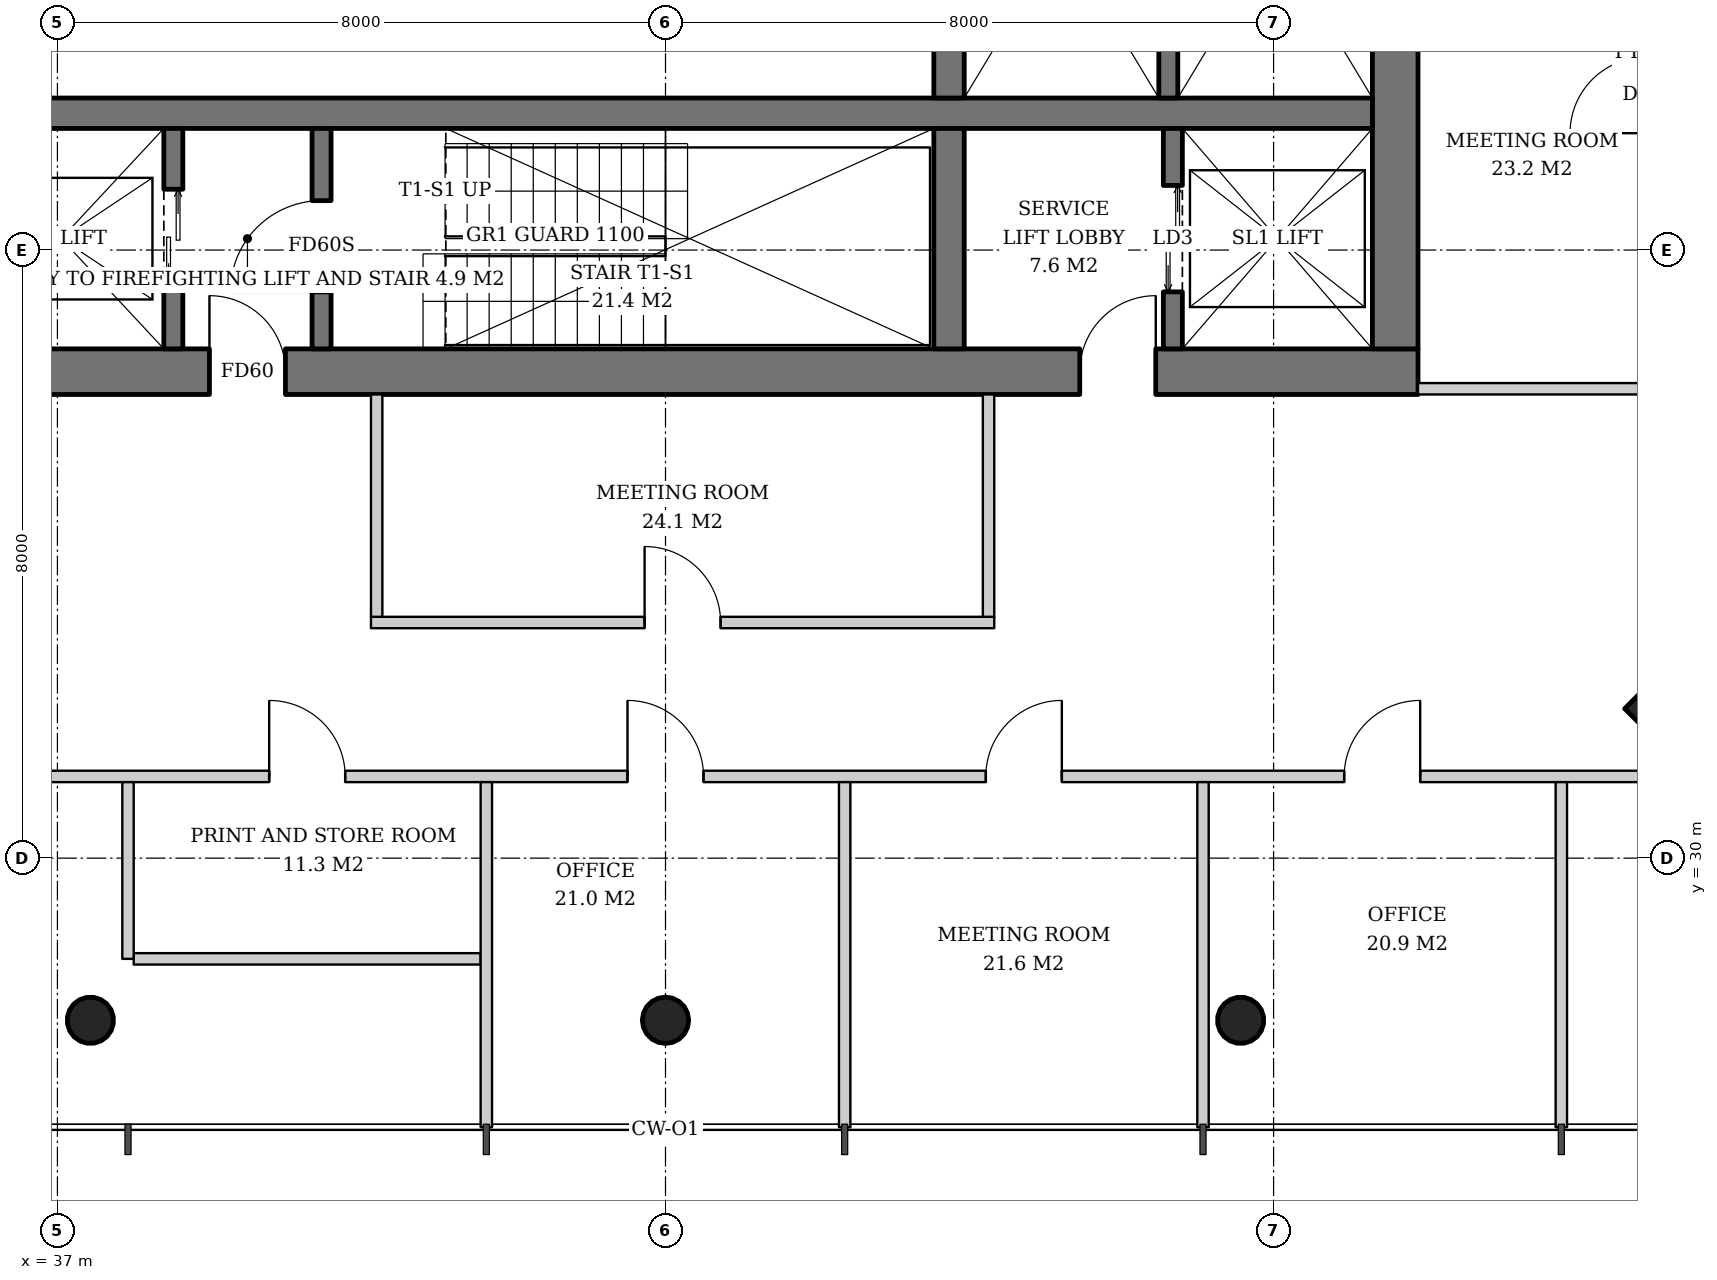
"""IFC4 building model, lengths in metres.
Left out: names, types, materials, properties, quantities, classifications, styles, units other than length and angle.
Written with IfcOpenShell. Run it as: python <this file> out.ifc"""

import sys

from ifc_helpers import new_model, si_unit, direction, frame, frame_2d, origin, origin_2d, place, context, subcontext, project, spatial, rectangle, hollow_circle, extrude, element, fill, save


model = new_model("IFC4")
c1 = context("Model", 3, precision=1e-05, world=origin(), true_north=direction((0.0, 1.0)))
c2 = subcontext(c1, "Body", "Model", "MODEL_VIEW")
j1 = project(units=[si_unit("LENGTHUNIT", "METRE"), si_unit("PLANEANGLEUNIT", "RADIAN")], contexts=[c1])
p1 = place(None, origin())
s1 = spatial("IfcSite", under=j1, at=p1, CompositionType="ELEMENT")
p2 = place(p1, origin())
s2 = spatial("IfcBuilding", under=s1, at=p2, CompositionType="ELEMENT")
p3 = place(p2, frame((0.0, 0.0, 203.4)))
s3 = spatial("IfcBuildingStorey", under=s2, at=p3, CompositionType="ELEMENT", Elevation=203.4)
p4 = place(p3, frame((59.072, 31.928, 0.0), z_axis=(-0.031962158256, 0.031962158256, 0.998977898093), x_axis=(-0.707106781187, -0.707106781187, 0.0)))
e1 = element("IfcColumn", 1, at=p4, inside=s3, PredefinedType="COLUMN", context=c2, shape_type="SweptSolid", body=[
    extrude(rectangle(XDim=2.0, YDim=2.0, at=origin_2d()), origin(), (0.0, 0.0, 1.0), 3.804),
])
p5 = place(p3, frame((37.414, 27.829, 0.0), z_axis=(0.015987237665, 0.031910269556, 0.999362868496), x_axis=(-0.894067115991, 0.447933021895, 0.0)))
e2 = element("IfcColumn", 2, at=p5, inside=s3, PredefinedType="COLUMN", context=c2, shape_type="SweptSolid", body=[
    extrude(hollow_circle(Radius=0.305, WallThickness=0.025, at=origin_2d()), origin(), (0.0, 0.0, 1.0), 3.802),
])
p6 = place(p3, frame((45.0, 27.829, 0.0), z_axis=(0.0, 0.031914348339, 0.999490607445), x_axis=(-1.0, 0.0, 0.0)))
e3 = element("IfcColumn", 3, at=p6, inside=s3, PredefinedType="COLUMN", context=c2, shape_type="SweptSolid", body=[
    extrude(hollow_circle(Radius=0.305, WallThickness=0.025, at=origin_2d()), origin(), (0.0, 0.0, 1.0), 3.802),
])
p7 = place(p3, frame((52.586, 27.829, 0.0), z_axis=(-0.015987237665, 0.031910269556, 0.999362868496), x_axis=(-0.894067115991, -0.447933021895, 0.0)))
e4 = element("IfcColumn", 4, at=p7, inside=s3, PredefinedType="COLUMN", context=c2, shape_type="SweptSolid", body=[
    extrude(hollow_circle(Radius=0.305, WallThickness=0.025, at=origin_2d()), origin(), (0.0, 0.0, 1.0), 3.802),
])
p8 = place(p3, frame((35.1, 36.4, 0.0), z_axis=(0.0, 0.0, 1.0), x_axis=(1.0, 0.0, 0.0)))
e5 = element("IfcWall", 5, at=p8, inside=s3, PredefinedType="SHEAR", context=c2, shape_type="SweptSolid", body=[
    extrude(rectangle(XDim=19.8, YDim=0.6, at=frame_2d((9.9, 0.0))), origin(), (0.0, 0.0, 1.0), 3.8),
])
p9 = place(p8, frame((3.9, 0.0, 0.0)))
e6 = element("IfcOpeningElement", 6, at=p9, cuts=e5, PredefinedType="OPENING", context=c2, shape_type="SweptSolid", body=[
    extrude(rectangle(XDim=1.0, YDim=2.1, at=frame_2d((0.5, 1.05))), frame((0.0, 0.31, 0.0), z_axis=(0.0, -1.0, 0.0), x_axis=(1.0, 0.0, 0.0)), (0.0, 0.0, 1.0), 0.62),
])
p10 = place(p8, frame((15.35, 0.0, 0.0)))
e7 = element("IfcOpeningElement", 7, at=p10, cuts=e5, PredefinedType="OPENING", context=c2, shape_type="SweptSolid", body=[
    extrude(rectangle(XDim=1.0, YDim=2.1, at=frame_2d((0.5, 1.05))), frame((0.0, 0.31, 0.0), z_axis=(0.0, -1.0, 0.0), x_axis=(1.0, 0.0, 0.0)), (0.0, 0.0, 1.0), 0.62),
])
p11 = place(p3, frame((54.6, 36.7, 0.0), z_axis=(0.0, 0.0, 1.0), x_axis=(0.0, 1.0, 0.0)))
e8 = element("IfcWall", 8, at=p11, inside=s3, PredefinedType="SHEAR", context=c2, shape_type="SweptSolid", body=[
    extrude(rectangle(XDim=18.6, YDim=0.6, at=frame_2d((9.3, 0.0))), origin(), (0.0, 0.0, 1.0), 3.8),
])
p12 = place(p11, frame((8.4, 0.0, 0.0)))
e9 = element("IfcOpeningElement", 9, at=p12, cuts=e8, PredefinedType="OPENING", context=c2, shape_type="SweptSolid", body=[
    extrude(rectangle(XDim=1.8, YDim=2.4, at=frame_2d((0.9, 1.2))), frame((0.0, 0.31, 0.0), z_axis=(0.0, -1.0, 0.0), x_axis=(1.0, 0.0, 0.0)), (0.0, 0.0, 1.0), 0.62),
])
p13 = place(p3, frame((35.7, 39.8, 0.0), z_axis=(0.0, 0.0, 1.0), x_axis=(1.0, 0.0, 0.0)))
e10 = element("IfcWall", 10, at=p13, inside=s3, PredefinedType="SHEAR", context=c2, shape_type="SweptSolid", body=[
    extrude(rectangle(XDim=18.6, YDim=0.4, at=frame_2d((9.3, 0.0))), origin(), (0.0, 0.0, 1.0), 3.8),
])
p14 = place(p3, frame((48.73, 36.7, 0.0), z_axis=(0.0, 0.0, 1.0), x_axis=(0.0, 1.0, 0.0)))
e11 = element("IfcWall", 11, at=p14, inside=s3, PredefinedType="SHEAR", context=c2, shape_type="SweptSolid", body=[
    extrude(rectangle(XDim=2.9, YDim=0.4, at=frame_2d((1.45, 0.0))), origin(), (0.0, 0.0, 1.0), 3.8),
])
p15 = place(p3, frame((48.73, 40.0, 0.0), z_axis=(0.0, 0.0, 1.0), x_axis=(0.0, 1.0, 0.0)))
e12 = element("IfcWall", 12, at=p15, inside=s3, PredefinedType="SHEAR", context=c2, shape_type="SweptSolid", body=[
    extrude(rectangle(XDim=12.0, YDim=0.4, at=frame_2d((6.0, 0.0))), origin(), (0.0, 0.0, 1.0), 3.8),
])
p16 = place(p3, frame((38.525, 36.7, 0.0), z_axis=(0.0, 0.0, 1.0), x_axis=(0.0, 1.0, 0.0)))
e13 = element("IfcWall", 13, at=p16, inside=s3, PredefinedType="SHEAR", context=c2, shape_type="SweptSolid", body=[
    extrude(rectangle(XDim=2.9, YDim=0.25, at=frame_2d((1.45, 0.0))), origin(), (0.0, 0.0, 1.0), 3.8),
])
p17 = place(p16, frame((0.8, 0.0, 0.0)))
e14 = element("IfcOpeningElement", 14, at=p17, cuts=e13, PredefinedType="OPENING", context=c2, shape_type="SweptSolid", body=[
    extrude(rectangle(XDim=1.3, YDim=2.2, at=frame_2d((0.65, 1.1))), frame((0.0, 0.135, 0.0), z_axis=(0.0, -1.0, 0.0), x_axis=(1.0, 0.0, 0.0)), (0.0, 0.0, 1.0), 0.27),
])
p18 = place(p3, frame((40.475, 36.7, 0.0), z_axis=(0.0, 0.0, 1.0), x_axis=(0.0, 1.0, 0.0)))
e15 = element("IfcWall", 15, at=p18, inside=s3, PredefinedType="SHEAR", context=c2, shape_type="SweptSolid", body=[
    extrude(rectangle(XDim=2.9, YDim=0.25, at=frame_2d((1.45, 0.0))), origin(), (0.0, 0.0, 1.0), 3.8),
])
p19 = place(p18, frame((0.75, 0.0, 0.0)))
e16 = element("IfcOpeningElement", 16, at=p19, cuts=e15, PredefinedType="OPENING", context=c2, shape_type="SweptSolid", body=[
    extrude(rectangle(XDim=1.2, YDim=2.1, at=frame_2d((0.6, 1.05))), frame((0.0, 0.135, 0.0), z_axis=(0.0, -1.0, 0.0), x_axis=(1.0, 0.0, 0.0)), (0.0, 0.0, 1.0), 0.27),
])
p20 = place(p3, frame((51.675, 36.7, 0.0), z_axis=(0.0, 0.0, 1.0), x_axis=(0.0, 1.0, 0.0)))
e17 = element("IfcWall", 17, at=p20, inside=s3, PredefinedType="SHEAR", context=c2, shape_type="SweptSolid", body=[
    extrude(rectangle(XDim=2.9, YDim=0.25, at=frame_2d((1.45, 0.0))), origin(), (0.0, 0.0, 1.0), 3.8),
])
p21 = place(p20, frame((0.75, 0.0, 0.0)))
e18 = element("IfcOpeningElement", 18, at=p21, cuts=e17, PredefinedType="OPENING", context=c2, shape_type="SweptSolid", body=[
    extrude(rectangle(XDim=1.4, YDim=2.4, at=frame_2d((0.7, 1.2))), frame((0.0, 0.135, 0.0), z_axis=(0.0, -1.0, 0.0), x_axis=(1.0, 0.0, 0.0)), (0.0, 0.0, 1.0), 0.27),
])
p22 = place(p3, frame((51.615, 44.25, 0.0), z_axis=(0.0, 0.0, 1.0), x_axis=(0.0, -1.0, 0.0)))
e19 = element("IfcWall", 19, at=p22, inside=s3, PredefinedType="SHEAR", context=c2, shape_type="SweptSolid", body=[
    extrude(rectangle(XDim=4.25, YDim=0.25, at=frame_2d((2.125, 0.0))), origin(), (0.0, 0.0, 1.0), 3.8),
])
p23 = place(p3, frame((54.9, 36.175, 0.0), z_axis=(0.0, 0.0, 1.0), x_axis=(1.0, 0.0, 0.0)))
e20 = element("IfcWall", 20, at=p23, inside=s3, PredefinedType="PARTITIONING", context=c2, shape_type="SweptSolid", body=[
    extrude(rectangle(XDim=2.925, YDim=0.15, at=frame_2d((1.462, 0.0))), origin(), (0.0, 0.0, 1.0), 2.867),
])
p24 = place(p3, frame((41.125, 33.1, 0.0), z_axis=(0.0, 0.0, 1.0), x_axis=(1.0, 0.0, 0.0)))
e21 = element("IfcWall", 21, at=p24, inside=s3, PredefinedType="PARTITIONING", context=c2, shape_type="SweptSolid", body=[
    extrude(rectangle(XDim=8.2, YDim=0.15, at=frame_2d((4.1, 0.0))), origin(), (0.0, 0.0, 1.0), 2.867),
])
p25 = place(p24, frame((3.6, 0.0, 0.0)))
e22 = element("IfcOpeningElement", 22, at=p25, cuts=e21, PredefinedType="OPENING", context=c2, shape_type="SweptSolid", body=[
    extrude(rectangle(XDim=1.0, YDim=2.1, at=frame_2d((0.5, 1.05))), frame((0.0, 0.085, 0.0), z_axis=(0.0, -1.0, 0.0), x_axis=(1.0, 0.0, 0.0)), (0.0, 0.0, 1.0), 0.17),
])
for number, where, z_axis, x_axis in (
    (23, (41.2, 36.1, 0.0), (0.0, 0.0, 1.0), (0.0, -1.0, 0.0)),
    (24, (49.25, 36.1, 0.0), (0.0, 0.0, 1.0), (0.0, -1.0, 0.0)),
):
    element("IfcWall", number, at=place(p3, frame(where, z_axis=z_axis, x_axis=x_axis)), inside=s3, PredefinedType="PARTITIONING", context=c2, shape_type="SweptSolid", body=[
        extrude(rectangle(XDim=2.925, YDim=0.15, at=frame_2d((1.462, 0.0))), origin(), (0.0, 0.0, 1.0), 3.62),
    ])
p26 = place(p3, frame((38.004, 28.675, 0.0), z_axis=(0.0, 0.0, 1.0), x_axis=(1.0, 0.0, 0.0)))
e25 = element("IfcWall", 25, at=p26, inside=s3, PredefinedType="PARTITIONING", context=c2, shape_type="SweptSolid", body=[
    extrude(rectangle(XDim=4.564, YDim=0.15, at=frame_2d((2.282, 0.0))), origin(), (0.0, 0.0, 1.0), 2.867),
])
p27 = place(p3, frame((31.564, 31.075, 0.0), z_axis=(0.0, 0.0, 1.0), x_axis=(1.0, 0.0, 0.0)))
e26 = element("IfcWall", 26, at=p27, inside=s3, PredefinedType="PARTITIONING", context=c2, shape_type="SweptSolid", body=[
    extrude(rectangle(XDim=26.872, YDim=0.15, at=frame_2d((13.436, 0.0))), origin(), (0.0, 0.0, 1.0), 2.867),
])
p28 = place(p27, frame((3.507, 0.0, 0.0)))
e27 = element("IfcOpeningElement", 27, at=p28, cuts=e26, PredefinedType="OPENING", context=c2, shape_type="SweptSolid", body=[
    extrude(rectangle(XDim=1.0, YDim=2.1, at=frame_2d((0.5, 1.05))), frame((0.0, 0.085, 0.0), z_axis=(0.0, -1.0, 0.0), x_axis=(1.0, 0.0, 0.0)), (0.0, 0.0, 1.0), 0.17),
])
p29 = place(p27, frame((8.221, 0.0, 0.0)))
e28 = element("IfcOpeningElement", 28, at=p29, cuts=e26, PredefinedType="OPENING", context=c2, shape_type="SweptSolid", body=[
    extrude(rectangle(XDim=1.0, YDim=2.1, at=frame_2d((0.5, 1.05))), frame((0.0, 0.085, 0.0), z_axis=(0.0, -1.0, 0.0), x_axis=(1.0, 0.0, 0.0)), (0.0, 0.0, 1.0), 0.17),
])
p30 = place(p27, frame((12.936, 0.0, 0.0)))
e29 = element("IfcOpeningElement", 29, at=p30, cuts=e26, PredefinedType="OPENING", context=c2, shape_type="SweptSolid", body=[
    extrude(rectangle(XDim=1.0, YDim=2.1, at=frame_2d((0.5, 1.05))), frame((0.0, 0.085, 0.0), z_axis=(0.0, -1.0, 0.0), x_axis=(1.0, 0.0, 0.0)), (0.0, 0.0, 1.0), 0.17),
])
p31 = place(p27, frame((17.65, 0.0, 0.0)))
e30 = element("IfcOpeningElement", 30, at=p31, cuts=e26, PredefinedType="OPENING", context=c2, shape_type="SweptSolid", body=[
    extrude(rectangle(XDim=1.0, YDim=2.1, at=frame_2d((0.5, 1.05))), frame((0.0, 0.085, 0.0), z_axis=(0.0, -1.0, 0.0), x_axis=(1.0, 0.0, 0.0)), (0.0, 0.0, 1.0), 0.17),
])
p32 = place(p27, frame((22.364, 0.0, 0.0)))
e31 = element("IfcOpeningElement", 31, at=p32, cuts=e26, PredefinedType="OPENING", context=c2, shape_type="SweptSolid", body=[
    extrude(rectangle(XDim=1.0, YDim=2.1, at=frame_2d((0.5, 1.05))), frame((0.0, 0.085, 0.0), z_axis=(0.0, -1.0, 0.0), x_axis=(1.0, 0.0, 0.0)), (0.0, 0.0, 1.0), 0.17),
])
p33 = place(p3, frame((37.928, 31.0, 0.0), z_axis=(0.0, 0.0, 1.0), x_axis=(0.0, -1.0, 0.0)))
e32 = element("IfcWall", 32, at=p33, inside=s3, PredefinedType="PARTITIONING", context=c2, shape_type="SweptSolid", body=[
    extrude(rectangle(XDim=2.325, YDim=0.15, at=frame_2d((1.163, 0.0))), origin(), (0.0, 0.0, 1.0), 3.62),
])
p34 = place(p3, frame((42.643, 31.0, 0.0), z_axis=(0.0, 0.0, 1.0), x_axis=(0.0, -1.0, 0.0)))
e33 = element("IfcWall", 33, at=p34, inside=s3, PredefinedType="PARTITIONING", context=c2, shape_type="SweptSolid", body=[
    extrude(rectangle(XDim=4.54, YDim=0.15, at=frame_2d((2.27, 0.0))), origin(), (0.0, 0.0, 1.0), 3.12),
])
p35 = place(p3, frame((47.357, 31.0, 0.0), z_axis=(0.0, 0.0, 1.0), x_axis=(0.0, -1.0, 0.0)))
e34 = element("IfcWall", 34, at=p35, inside=s3, PredefinedType="PARTITIONING", context=c2, shape_type="SweptSolid", body=[
    extrude(rectangle(XDim=4.54, YDim=0.15, at=frame_2d((2.27, 0.0))), origin(), (0.0, 0.0, 1.0), 2.867),
])
for number, where, z_axis, x_axis in (
    (35, (52.072, 31.0, 0.0), (0.0, 0.0, 1.0), (0.0, -1.0, 0.0)),
    (36, (56.786, 31.0, 0.0), (0.0, 0.0, 1.0), (0.0, -1.0, 0.0)),
):
    element("IfcWall", number, at=place(p3, frame(where, z_axis=z_axis, x_axis=x_axis)), inside=s3, PredefinedType="PARTITIONING", context=c2, shape_type="SweptSolid", body=[
        extrude(rectangle(XDim=4.54, YDim=0.15, at=frame_2d((2.27, 0.0))), origin(), (0.0, 0.0, 1.0), 3.12),
    ])
p36 = place(p17, origin())
e37 = element("IfcDoor", 37, at=p36, inside=s3, OperationType="DOUBLE_DOOR_SLIDING", PredefinedType="DOOR", context=c2, shape_type="SweptSolid", body=[
    extrude(rectangle(XDim=1.3, YDim=2.2, at=frame_2d((0.65, 1.1))), frame((0.0, 0.025, 0.0), z_axis=(0.0, -1.0, 0.0), x_axis=(1.0, 0.0, 0.0)), (0.0, 0.0, 1.0), 0.05),
])
fill(e14, e37)
p37 = place(p19, origin())
e38 = element("IfcDoor", 38, at=p37, inside=s3, OperationType="SINGLE_SWING_LEFT", PredefinedType="DOOR", context=c2, shape_type="SweptSolid", body=[
    extrude(rectangle(XDim=1.2, YDim=2.1, at=frame_2d((0.6, 1.05))), frame((0.0, 0.025, 0.0), z_axis=(0.0, -1.0, 0.0), x_axis=(1.0, 0.0, 0.0)), (0.0, 0.0, 1.0), 0.05),
])
fill(e16, e38)
p38 = place(p21, origin())
e39 = element("IfcDoor", 39, at=p38, inside=s3, OperationType="DOUBLE_DOOR_SLIDING", PredefinedType="DOOR", context=c2, shape_type="SweptSolid", body=[
    extrude(rectangle(XDim=1.4, YDim=2.4, at=frame_2d((0.7, 1.2))), frame((0.0, 0.025, 0.0), z_axis=(0.0, -1.0, 0.0), x_axis=(1.0, 0.0, 0.0)), (0.0, 0.0, 1.0), 0.05),
])
fill(e18, e39)
p39 = place(p9, origin())
e40 = element("IfcDoor", 40, at=p39, inside=s3, OperationType="SINGLE_SWING_LEFT", PredefinedType="DOOR", context=c2, shape_type="SweptSolid", body=[
    extrude(rectangle(XDim=1.0, YDim=2.1, at=frame_2d((0.5, 1.05))), frame((0.0, 0.025, 0.0), z_axis=(0.0, -1.0, 0.0), x_axis=(1.0, 0.0, 0.0)), (0.0, 0.0, 1.0), 0.05),
])
fill(e6, e40)
p40 = place(p10, origin())
e41 = element("IfcDoor", 41, at=p40, inside=s3, OperationType="SINGLE_SWING_RIGHT", PredefinedType="DOOR", context=c2, shape_type="SweptSolid", body=[
    extrude(rectangle(XDim=1.0, YDim=2.1, at=frame_2d((0.5, 1.05))), frame((0.0, 0.025, 0.0), z_axis=(0.0, -1.0, 0.0), x_axis=(1.0, 0.0, 0.0)), (0.0, 0.0, 1.0), 0.05),
])
fill(e7, e41)
p41 = place(p25, origin())
e42 = element("IfcDoor", 42, at=p41, inside=s3, OperationType="SINGLE_SWING_LEFT", PredefinedType="DOOR", context=c2, shape_type="SweptSolid", body=[
    extrude(rectangle(XDim=1.0, YDim=2.1, at=frame_2d((0.5, 1.05))), frame((0.0, 0.025, 0.0), z_axis=(0.0, -1.0, 0.0), x_axis=(1.0, 0.0, 0.0)), (0.0, 0.0, 1.0), 0.05),
])
fill(e22, e42)
p42 = place(p29, origin())
e43 = element("IfcDoor", 43, at=p42, inside=s3, OperationType="SINGLE_SWING_LEFT", PredefinedType="DOOR", context=c2, shape_type="SweptSolid", body=[
    extrude(rectangle(XDim=1.0, YDim=2.1, at=frame_2d((0.5, 1.05))), frame((0.0, 0.025, 0.0), z_axis=(0.0, -1.0, 0.0), x_axis=(1.0, 0.0, 0.0)), (0.0, 0.0, 1.0), 0.05),
])
fill(e28, e43)
p43 = place(p30, origin())
e44 = element("IfcDoor", 44, at=p43, inside=s3, OperationType="SINGLE_SWING_LEFT", PredefinedType="DOOR", context=c2, shape_type="SweptSolid", body=[
    extrude(rectangle(XDim=1.0, YDim=2.1, at=frame_2d((0.5, 1.05))), frame((0.0, 0.025, 0.0), z_axis=(0.0, -1.0, 0.0), x_axis=(1.0, 0.0, 0.0)), (0.0, 0.0, 1.0), 0.05),
])
fill(e29, e44)
p44 = place(p31, origin())
e45 = element("IfcDoor", 45, at=p44, inside=s3, OperationType="SINGLE_SWING_RIGHT", PredefinedType="DOOR", context=c2, shape_type="SweptSolid", body=[
    extrude(rectangle(XDim=1.0, YDim=2.1, at=frame_2d((0.5, 1.05))), frame((0.0, 0.025, 0.0), z_axis=(0.0, -1.0, 0.0), x_axis=(1.0, 0.0, 0.0)), (0.0, 0.0, 1.0), 0.05),
])
fill(e30, e45)
p45 = place(p32, origin())
e46 = element("IfcDoor", 46, at=p45, inside=s3, OperationType="SINGLE_SWING_RIGHT", PredefinedType="DOOR", context=c2, shape_type="SweptSolid", body=[
    extrude(rectangle(XDim=1.0, YDim=2.1, at=frame_2d((0.5, 1.05))), frame((0.0, 0.025, 0.0), z_axis=(0.0, -1.0, 0.0), x_axis=(1.0, 0.0, 0.0)), (0.0, 0.0, 1.0), 0.05),
])
fill(e31, e46)
save(model, sys.argv[1])
